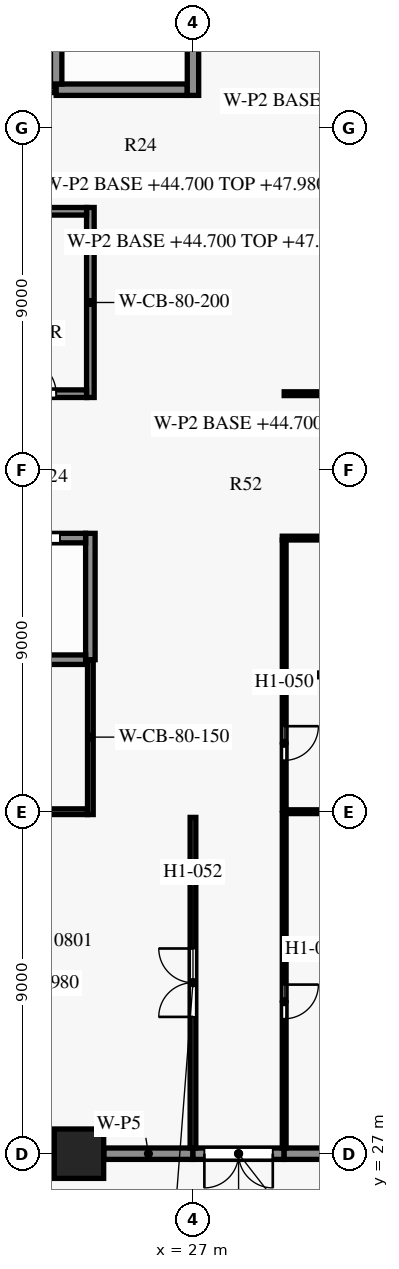
"""IFC4 building model, lengths in metres.
Left out: names, types, materials, properties, quantities, classifications, styles, units other than length and angle.
Written with IfcOpenShell. Run it as: python <this file> out.ifc"""

import sys

from ifc_helpers import new_model, si_unit, direction, frame, frame_2d, origin, origin_2d, place, context, subcontext, project, spatial, rectangle, extrude, element, fill, save


model = new_model("IFC4")
c1 = context("Model", 3, precision=1e-05, world=origin(), true_north=direction((0.0, 1.0)))
c2 = subcontext(c1, "Body", "Model", "MODEL_VIEW")
j1 = project(units=[si_unit("LENGTHUNIT", "METRE"), si_unit("PLANEANGLEUNIT", "RADIAN")], contexts=[c1])
p1 = place(None, origin())
s1 = spatial("IfcSite", under=j1, at=p1, CompositionType="ELEMENT")
p2 = place(p1, origin())
s2 = spatial("IfcBuilding", under=s1, at=p2, CompositionType="ELEMENT")
p3 = place(p2, frame((0.0, 0.0, 44.7)))
s3 = spatial("IfcBuildingStorey", under=s2, at=p3, CompositionType="ELEMENT", Elevation=44.7)
p4 = place(p3, frame((24.0, 27.0, 0.0), z_axis=(0.0, 0.0, 1.0), x_axis=(1.0, 0.0, 0.0)))
e1 = element("IfcColumn", 1, at=p4, inside=s3, PredefinedType="COLUMN", context=c2, shape_type="SweptSolid", body=[
    extrude(rectangle(XDim=1.3, YDim=1.3, at=origin_2d()), origin(), (0.0, 0.0, 1.0), 3.6),
])
p5 = place(p3, frame((12.4, 36.0, 0.0), z_axis=(0.0, 0.0, 1.0), x_axis=(1.0, 0.0, 0.0)))
e2 = element("IfcWall", 2, at=p5, inside=s3, PredefinedType="SHEAR", context=c2, shape_type="SweptSolid", body=[
    extrude(rectangle(XDim=11.825, YDim=0.15, at=frame_2d((5.913, 0.0))), origin(), (0.0, 0.0, 1.0), 3.3),
])
p6 = place(p5, frame((1.25, 0.0, 0.0)))
e3 = element("IfcOpeningElement", 3, at=p6, cuts=e2, PredefinedType="OPENING", context=c2, shape_type="SweptSolid", body=[
    extrude(rectangle(XDim=0.9, YDim=2.1, at=frame_2d((0.45, 1.05))), frame((0.0, 0.085, 0.0), z_axis=(0.0, -1.0, 0.0), x_axis=(1.0, 0.0, 0.0)), (0.0, 0.0, 1.0), 0.17),
])
p7 = place(p5, frame((5.2, 0.0, 0.0)))
e4 = element("IfcOpeningElement", 4, at=p7, cuts=e2, PredefinedType="OPENING", context=c2, shape_type="SweptSolid", body=[
    extrude(rectangle(XDim=0.9, YDim=2.1, at=frame_2d((0.45, 1.05))), frame((0.0, 0.085, 0.0), z_axis=(0.0, -1.0, 0.0), x_axis=(1.0, 0.0, 0.0)), (0.0, 0.0, 1.0), 0.17),
])
p8 = place(p5, frame((9.425, 0.0, 0.0)))
e5 = element("IfcOpeningElement", 5, at=p8, cuts=e2, PredefinedType="OPENING", context=c2, shape_type="SweptSolid", body=[
    extrude(rectangle(XDim=0.95, YDim=2.1, at=frame_2d((0.475, 1.05))), frame((0.0, 0.085, 0.0), z_axis=(0.0, -1.0, 0.0), x_axis=(1.0, 0.0, 0.0)), (0.0, 0.0, 1.0), 0.17),
])
p9 = place(p3, frame((8.1, 40.0, 0.0), z_axis=(0.0, 0.0, 1.0), x_axis=(1.0, 0.0, 0.0)))
e6 = element("IfcWall", 6, at=p9, inside=s3, PredefinedType="SHEAR", context=c2, shape_type="SweptSolid", body=[
    extrude(rectangle(XDim=16.075, YDim=0.25, at=frame_2d((8.038, 0.0))), origin(), (0.0, 0.0, 1.0), 3.3),
])
p10 = place(p3, frame((8.1, 43.2, 0.0), z_axis=(0.0, 0.0, 1.0), x_axis=(1.0, 0.0, 0.0)))
e7 = element("IfcWall", 7, at=p10, inside=s3, PredefinedType="SHEAR", context=c2, shape_type="SweptSolid", body=[
    extrude(rectangle(XDim=16.075, YDim=0.25, at=frame_2d((8.038, 0.0))), origin(), (0.0, 0.0, 1.0), 3.3),
])
p11 = place(p10, frame((14.3, 0.0, 0.0)))
e8 = element("IfcOpeningElement", 8, at=p11, cuts=e7, PredefinedType="OPENING", context=c2, shape_type="SweptSolid", body=[
    extrude(rectangle(XDim=1.1, YDim=2.1, at=frame_2d((0.55, 1.05))), frame((0.0, 0.135, 0.0), z_axis=(0.0, -1.0, 0.0), x_axis=(1.0, 0.0, 0.0)), (0.0, 0.0, 1.0), 0.27),
])
p12 = place(p10, frame((0.8, 0.0, 0.0)))
e9 = element("IfcOpeningElement", 9, at=p12, cuts=e7, PredefinedType="OPENING", context=c2, shape_type="SweptSolid", body=[
    extrude(rectangle(XDim=1.1, YDim=2.1, at=frame_2d((0.55, 1.05))), frame((0.0, 0.135, 0.0), z_axis=(0.0, -1.0, 0.0), x_axis=(1.0, 0.0, 0.0)), (0.0, 0.0, 1.0), 0.27),
])
p13 = place(p10, frame((3.5, 0.0, 0.0)))
e10 = element("IfcOpeningElement", 10, at=p13, cuts=e7, PredefinedType="OPENING", context=c2, shape_type="SweptSolid", body=[
    extrude(rectangle(XDim=1.1, YDim=2.1, at=frame_2d((0.55, 1.05))), frame((0.0, 0.135, 0.0), z_axis=(0.0, -1.0, 0.0), x_axis=(1.0, 0.0, 0.0)), (0.0, 0.0, 1.0), 0.27),
])
p14 = place(p10, frame((6.2, 0.0, 0.0)))
e11 = element("IfcOpeningElement", 11, at=p14, cuts=e7, PredefinedType="OPENING", context=c2, shape_type="SweptSolid", body=[
    extrude(rectangle(XDim=1.1, YDim=2.1, at=frame_2d((0.55, 1.05))), frame((0.0, 0.135, 0.0), z_axis=(0.0, -1.0, 0.0), x_axis=(1.0, 0.0, 0.0)), (0.0, 0.0, 1.0), 0.27),
])
p15 = place(p10, frame((8.9, 0.0, 0.0)))
e12 = element("IfcOpeningElement", 12, at=p15, cuts=e7, PredefinedType="OPENING", context=c2, shape_type="SweptSolid", body=[
    extrude(rectangle(XDim=1.1, YDim=2.1, at=frame_2d((0.55, 1.05))), frame((0.0, 0.135, 0.0), z_axis=(0.0, -1.0, 0.0), x_axis=(1.0, 0.0, 0.0)), (0.0, 0.0, 1.0), 0.27),
])
p16 = place(p10, frame((11.6, 0.0, 0.0)))
e13 = element("IfcOpeningElement", 13, at=p16, cuts=e7, PredefinedType="OPENING", context=c2, shape_type="SweptSolid", body=[
    extrude(rectangle(XDim=1.1, YDim=2.1, at=frame_2d((0.55, 1.05))), frame((0.0, 0.135, 0.0), z_axis=(0.0, -1.0, 0.0), x_axis=(1.0, 0.0, 0.0)), (0.0, 0.0, 1.0), 0.27),
])
p17 = place(p3, frame((21.6, 47.0, 0.0), z_axis=(0.0, 0.0, 1.0), x_axis=(1.0, 0.0, 0.0)))
e14 = element("IfcWall", 14, at=p17, inside=s3, PredefinedType="PARTITIONING", context=c2, shape_type="SweptSolid", body=[
    extrude(rectangle(XDim=2.6, YDim=0.2, at=frame_2d((1.3, 0.0))), origin(), (0.0, 0.0, 1.0), 3.3),
])
p18 = place(p17, frame((0.9, 0.0, 0.0)))
e15 = element("IfcOpeningElement", 15, at=p18, cuts=e14, PredefinedType="OPENING", context=c2, shape_type="SweptSolid", body=[
    extrude(rectangle(XDim=0.9, YDim=2.1, at=frame_2d((0.45, 1.05))), frame((0.0, 0.11, 0.0), z_axis=(0.0, -1.0, 0.0), x_axis=(1.0, 0.0, 0.0)), (0.0, 0.0, 1.0), 0.22),
])
p19 = place(p3, frame((21.6, 51.8, 0.0), z_axis=(0.0, 0.0, 1.0), x_axis=(1.0, 0.0, 0.0)))
e16 = element("IfcWall", 16, at=p19, inside=s3, PredefinedType="PARTITIONING", context=c2, shape_type="SweptSolid", body=[
    extrude(rectangle(XDim=2.6, YDim=0.2, at=frame_2d((1.3, 0.0))), origin(), (0.0, 0.0, 1.0), 3.3),
])
p20 = place(p3, frame((13.5, 55.0, 0.0), z_axis=(0.0, 0.0, 1.0), x_axis=(1.0, 0.0, 0.0)))
e17 = element("IfcWall", 17, at=p20, inside=s3, PredefinedType="PARTITIONING", context=c2, shape_type="SweptSolid", body=[
    extrude(rectangle(XDim=9.9, YDim=0.15, at=frame_2d((4.95, 0.0))), origin(), (0.0, 0.0, 1.0), 3.3),
])
p21 = place(p20, frame((4.45, 0.0, 0.0)))
e18 = element("IfcOpeningElement", 18, at=p21, cuts=e17, PredefinedType="OPENING", context=c2, shape_type="SweptSolid", body=[
    extrude(rectangle(XDim=1.0, YDim=2.1, at=frame_2d((0.5, 1.05))), frame((0.0, 0.085, 0.0), z_axis=(0.0, -1.0, 0.0), x_axis=(1.0, 0.0, 0.0)), (0.0, 0.0, 1.0), 0.17),
])
p22 = place(p3, frame((23.4, 55.0, 0.0), z_axis=(0.0, 0.0, 1.0), x_axis=(1.0, 0.0, 0.0)))
e19 = element("IfcWall", 19, at=p22, inside=s3, PredefinedType="SHEAR", context=c2, shape_type="SweptSolid", body=[
    extrude(rectangle(XDim=3.45, YDim=0.3, at=frame_2d((1.725, 0.0))), origin(), (0.0, 0.0, 1.0), 3.3),
])
p23 = place(p3, frame((23.4, 55.15, 0.0), z_axis=(0.0, 0.0, 1.0), x_axis=(0.0, 1.0, 0.0)))
e20 = element("IfcWall", 20, at=p23, inside=s3, PredefinedType="SHEAR", context=c2, shape_type="SweptSolid", body=[
    extrude(rectangle(XDim=8.0, YDim=0.3, at=frame_2d((4.0, 0.0))), origin(), (0.0, 0.0, 1.0), 3.3),
])
p24 = place(p3, frame((24.3, 35.925, 0.0), z_axis=(0.0, 0.0, 1.0), x_axis=(0.0, 1.0, 0.0)))
e21 = element("IfcWall", 21, at=p24, inside=s3, PredefinedType="SHEAR", context=c2, shape_type="SweptSolid", body=[
    extrude(rectangle(XDim=4.075, YDim=0.15, at=frame_2d((2.038, 0.0))), origin(), (0.0, 0.0, 1.0), 3.3),
])
p25 = place(p3, frame((24.3, 46.9, 0.0), z_axis=(0.0, 0.0, 1.0), x_axis=(0.0, 1.0, 0.0)))
e22 = element("IfcWall", 22, at=p25, inside=s3, PredefinedType="SHEAR", context=c2, shape_type="SweptSolid", body=[
    extrude(rectangle(XDim=5.0, YDim=0.2, at=frame_2d((2.5, 0.0))), origin(), (0.0, 0.0, 1.0), 3.3),
])
p26 = place(p3, frame((24.3, 40.0, 0.0), z_axis=(0.0, 0.0, 1.0), x_axis=(0.0, 1.0, 0.0)))
e23 = element("IfcWall", 23, at=p26, inside=s3, PredefinedType="SHEAR", context=c2, shape_type="SweptSolid", body=[
    extrude(rectangle(XDim=3.325, YDim=0.25, at=frame_2d((1.663, 0.0))), origin(), (0.0, 0.0, 1.0), 3.3),
])
p27 = place(p3, frame((27.0, 54.85, 0.0), z_axis=(0.0, 0.0, 1.0), x_axis=(0.0, 1.0, 0.0)))
e24 = element("IfcWall", 24, at=p27, inside=s3, PredefinedType="SHEAR", context=c2, shape_type="SweptSolid", body=[
    extrude(rectangle(XDim=8.35, YDim=0.3, at=frame_2d((4.175, 0.0))), origin(), (0.0, 0.0, 1.0), 3.3),
])
p28 = place(p27, frame((6.55, 0.0, 0.0)))
e25 = element("IfcOpeningElement", 25, at=p28, cuts=e24, PredefinedType="OPENING", context=c2, shape_type="SweptSolid", body=[
    extrude(rectangle(XDim=1.2, YDim=2.2, at=frame_2d((0.6, 1.1))), frame((0.0, 0.16, 0.0), z_axis=(0.0, -1.0, 0.0), x_axis=(1.0, 0.0, 0.0)), (0.0, 0.0, 1.0), 0.32),
])
p29 = place(p3, frame((23.345, 27.0, 0.0), z_axis=(0.0, 0.0, 1.0), x_axis=(-1.0, 0.0, 0.0)))
e26 = element("IfcWall", 26, at=p29, inside=s3, PredefinedType="PARTITIONING", context=c2, shape_type="SweptSolid", body=[
    extrude(rectangle(XDim=9.845, YDim=0.3, at=frame_2d((4.922, 0.0))), origin(), (0.0, 0.0, 1.0), 2.58),
])
p30 = place(p3, frame((27.0, 27.0, 0.0), z_axis=(0.0, 0.0, 1.0), x_axis=(-1.0, 0.0, 0.0)))
e27 = element("IfcWall", 27, at=p30, inside=s3, PredefinedType="PARTITIONING", context=c2, shape_type="SweptSolid", body=[
    extrude(rectangle(XDim=2.345, YDim=0.3, at=frame_2d((1.172, 0.0))), origin(), (0.0, 0.0, 1.0), 2.58),
])
p31 = place(p3, frame((29.4, 27.0, 0.0), z_axis=(0.0, 0.0, 1.0), x_axis=(-1.0, 0.0, 0.0)))
e28 = element("IfcWall", 28, at=p31, inside=s3, PredefinedType="PARTITIONING", context=c2, shape_type="SweptSolid", body=[
    extrude(rectangle(XDim=2.4, YDim=0.3, at=frame_2d((1.2, 0.0))), origin(), (0.0, 0.0, 1.0), 2.58),
])
p32 = place(p31, frame((0.3, 0.0, 0.0)))
e29 = element("IfcOpeningElement", 29, at=p32, cuts=e28, PredefinedType="OPENING", context=c2, shape_type="SweptSolid", body=[
    extrude(rectangle(XDim=1.8, YDim=2.1, at=frame_2d((0.9, 1.05))), frame((0.0, 0.16, 0.0), z_axis=(0.0, -1.0, 0.0), x_axis=(1.0, 0.0, 0.0)), (0.0, 0.0, 1.0), 0.32),
])
p33 = place(p3, frame((34.975, 27.0, 0.0), z_axis=(0.0, 0.0, 1.0), x_axis=(-1.0, 0.0, 0.0)))
e30 = element("IfcWall", 30, at=p33, inside=s3, PredefinedType="PARTITIONING", context=c2, shape_type="SweptSolid", body=[
    extrude(rectangle(XDim=5.575, YDim=0.3, at=frame_2d((2.788, 0.0))), origin(), (0.0, 0.0, 1.0), 2.58),
])
p34 = place(p3, frame((27.0, 27.15, 0.0), z_axis=(0.0, 0.0, 1.0), x_axis=(0.0, 1.0, 0.0)))
e31 = element("IfcWall", 31, at=p34, inside=s3, PredefinedType="PARTITIONING", context=c2, shape_type="SweptSolid", body=[
    extrude(rectangle(XDim=8.7, YDim=0.15, at=frame_2d((4.35, 0.0))), origin(), (0.0, 0.0, 1.0), 3.28),
])
p35 = place(p34, frame((3.45, 0.0, 0.0)))
e32 = element("IfcOpeningElement", 32, at=p35, cuts=e31, PredefinedType="OPENING", context=c2, shape_type="SweptSolid", body=[
    extrude(rectangle(XDim=1.8, YDim=2.1, at=frame_2d((0.9, 1.05))), frame((0.0, 0.085, 0.0), z_axis=(0.0, -1.0, 0.0), x_axis=(1.0, 0.0, 0.0)), (0.0, 0.0, 1.0), 0.17),
])
p36 = place(p3, frame((29.4, 35.95, 0.0), z_axis=(0.0, 0.0, 1.0), x_axis=(0.0, -1.0, 0.0)))
e33 = element("IfcWall", 33, at=p36, inside=s3, PredefinedType="PARTITIONING", context=c2, shape_type="SweptSolid", body=[
    extrude(rectangle(XDim=8.8, YDim=0.1, at=frame_2d((4.4, 0.0))), origin(), (0.0, 0.0, 1.0), 3.28),
])
p37 = place(p36, frame((4.5, 0.0, 0.0)))
e34 = element("IfcOpeningElement", 34, at=p37, cuts=e33, PredefinedType="OPENING", context=c2, shape_type="SweptSolid", body=[
    extrude(rectangle(XDim=0.9, YDim=2.1, at=frame_2d((0.45, 1.05))), frame((0.0, 0.06, 0.0), z_axis=(0.0, -1.0, 0.0), x_axis=(1.0, 0.0, 0.0)), (0.0, 0.0, 1.0), 0.12),
])
p38 = place(p3, frame((36.0, 36.0, 0.0), z_axis=(0.0, 0.0, 1.0), x_axis=(-1.0, 0.0, 0.0)))
e35 = element("IfcWall", 35, at=p38, inside=s3, PredefinedType="PARTITIONING", context=c2, shape_type="SweptSolid", body=[
    extrude(rectangle(XDim=6.55, YDim=0.1, at=frame_2d((3.275, 0.0))), origin(), (0.0, 0.0, 1.0), 2.58),
])
p39 = place(p3, frame((29.4, 39.55, 0.0), z_axis=(0.0, 0.0, 1.0), x_axis=(0.0, -1.0, 0.0)))
e36 = element("IfcWall", 36, at=p39, inside=s3, PredefinedType="PARTITIONING", context=c2, shape_type="SweptSolid", body=[
    extrude(rectangle(XDim=3.5, YDim=0.1, at=frame_2d((1.75, 0.0))), origin(), (0.0, 0.0, 1.0), 3.28),
])
p40 = place(p39, frame((1.3, 0.0, 0.0)))
e37 = element("IfcOpeningElement", 37, at=p40, cuts=e36, PredefinedType="OPENING", context=c2, shape_type="SweptSolid", body=[
    extrude(rectangle(XDim=0.9, YDim=2.1, at=frame_2d((0.45, 1.05))), frame((0.0, 0.06, 0.0), z_axis=(0.0, -1.0, 0.0), x_axis=(1.0, 0.0, 0.0)), (0.0, 0.0, 1.0), 0.12),
])
p41 = place(p3, frame((35.345, 39.6, 0.0), z_axis=(0.0, 0.0, 1.0), x_axis=(-1.0, 0.0, 0.0)))
e38 = element("IfcWall", 38, at=p41, inside=s3, PredefinedType="PARTITIONING", context=c2, shape_type="SweptSolid", body=[
    extrude(rectangle(XDim=5.895, YDim=0.1, at=frame_2d((2.948, 0.0))), origin(), (0.0, 0.0, 1.0), 3.28),
])
p42 = place(p3, frame((29.4, 43.15, 0.0), z_axis=(0.0, 0.0, 1.0), x_axis=(0.0, -1.0, 0.0)))
e39 = element("IfcWall", 39, at=p42, inside=s3, PredefinedType="PARTITIONING", context=c2, shape_type="SweptSolid", body=[
    extrude(rectangle(XDim=3.5, YDim=0.1, at=frame_2d((1.75, 0.0))), origin(), (0.0, 0.0, 1.0), 3.28),
])
p43 = place(p3, frame((35.85, 43.2, 0.0), z_axis=(0.0, 0.0, 1.0), x_axis=(-1.0, 0.0, 0.0)))
e40 = element("IfcWall", 40, at=p43, inside=s3, PredefinedType="PARTITIONING", context=c2, shape_type="SweptSolid", body=[
    extrude(rectangle(XDim=6.5, YDim=0.1, at=frame_2d((3.25, 0.0))), origin(), (0.0, 0.0, 1.0), 3.28),
])
p44 = place(p43, frame((2.7, 0.0, 0.0)))
e41 = element("IfcOpeningElement", 41, at=p44, cuts=e40, PredefinedType="OPENING", context=c2, shape_type="SweptSolid", body=[
    extrude(rectangle(XDim=0.9, YDim=2.1, at=frame_2d((0.45, 1.05))), frame((0.0, 0.06, 0.0), z_axis=(0.0, -1.0, 0.0), x_axis=(1.0, 0.0, 0.0)), (0.0, 0.0, 1.0), 0.12),
])
p45 = place(p3, frame((29.4, 47.0, 0.0), z_axis=(0.0, 0.0, 1.0), x_axis=(1.0, 0.0, 0.0)))
e42 = element("IfcWall", 42, at=p45, inside=s3, PredefinedType="PARTITIONING", context=c2, shape_type="SweptSolid", body=[
    extrude(rectangle(XDim=2.1, YDim=0.1, at=frame_2d((1.05, 0.0))), origin(), (0.0, 0.0, 1.0), 3.28),
])
p46 = place(p18, origin())
e43 = element("IfcDoor", 43, at=p46, inside=s3, OperationType="SINGLE_SWING_LEFT", PredefinedType="DOOR", context=c2, shape_type="SweptSolid", body=[
    extrude(rectangle(XDim=0.9, YDim=2.1, at=frame_2d((0.45, 1.05))), frame((0.0, 0.025, 0.0), z_axis=(0.0, -1.0, 0.0), x_axis=(1.0, 0.0, 0.0)), (0.0, 0.0, 1.0), 0.05),
])
fill(e15, e43)
p47 = place(p11, origin())
e44 = element("IfcDoor", 44, at=p47, inside=s3, OperationType="DOUBLE_DOOR_SLIDING", PredefinedType="DOOR", context=c2, shape_type="SweptSolid", body=[
    extrude(rectangle(XDim=1.1, YDim=2.1, at=frame_2d((0.55, 1.05))), frame((0.0, 0.025, 0.0), z_axis=(0.0, -1.0, 0.0), x_axis=(1.0, 0.0, 0.0)), (0.0, 0.0, 1.0), 0.05),
])
fill(e8, e44)
p48 = place(p40, origin())
e45 = element("IfcDoor", 45, at=p48, inside=s3, OperationType="SINGLE_SWING_RIGHT", PredefinedType="DOOR", context=c2, shape_type="SweptSolid", body=[
    extrude(rectangle(XDim=0.9, YDim=2.1, at=frame_2d((0.45, 1.05))), frame((0.0, 0.025, 0.0), z_axis=(0.0, -1.0, 0.0), x_axis=(1.0, 0.0, 0.0)), (0.0, 0.0, 1.0), 0.05),
])
fill(e37, e45)
p49 = place(p37, origin())
e46 = element("IfcDoor", 46, at=p49, inside=s3, OperationType="SINGLE_SWING_LEFT", PredefinedType="DOOR", context=c2, shape_type="SweptSolid", body=[
    extrude(rectangle(XDim=0.9, YDim=2.1, at=frame_2d((0.45, 1.05))), frame((0.0, 0.025, 0.0), z_axis=(0.0, -1.0, 0.0), x_axis=(1.0, 0.0, 0.0)), (0.0, 0.0, 1.0), 0.05),
])
fill(e34, e46)
p50 = place(p35, origin())
e47 = element("IfcDoor", 47, at=p50, inside=s3, OperationType="DOUBLE_DOOR_SINGLE_SWING", PredefinedType="DOOR", context=c2, shape_type="SweptSolid", body=[
    extrude(rectangle(XDim=1.8, YDim=2.1, at=frame_2d((0.9, 1.05))), frame((0.0, 0.025, 0.0), z_axis=(0.0, -1.0, 0.0), x_axis=(1.0, 0.0, 0.0)), (0.0, 0.0, 1.0), 0.05),
])
fill(e32, e47)
p51 = place(p32, origin())
e48 = element("IfcDoor", 48, at=p51, inside=s3, OperationType="DOUBLE_DOOR_SINGLE_SWING", PredefinedType="DOOR", context=c2, shape_type="SweptSolid", body=[
    extrude(rectangle(XDim=1.8, YDim=2.1, at=frame_2d((0.9, 1.05))), frame((0.0, 0.025, 0.0), z_axis=(0.0, -1.0, 0.0), x_axis=(1.0, 0.0, 0.0)), (0.0, 0.0, 1.0), 0.05),
])
fill(e29, e48)
save(model, sys.argv[1])
